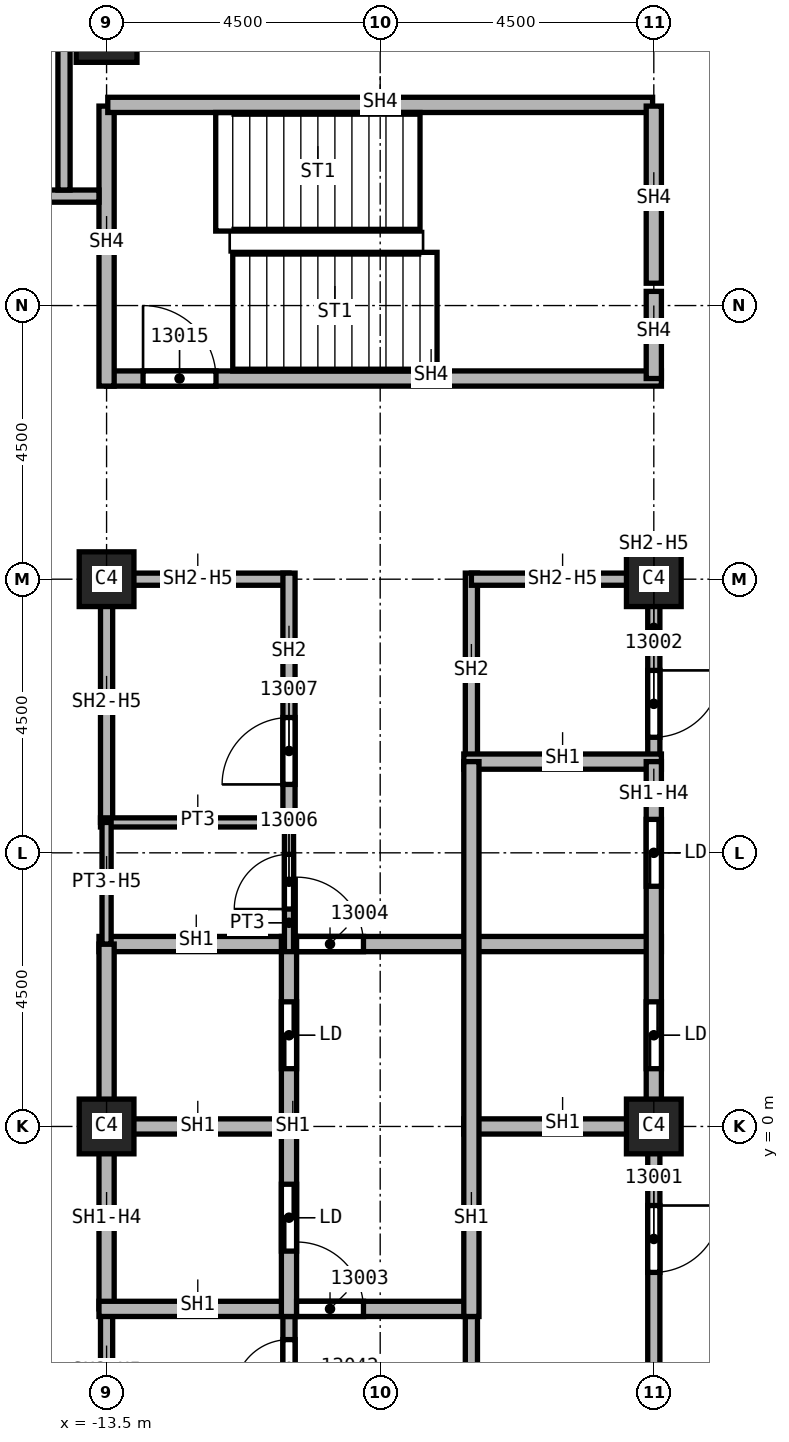
"""IFC4 building model, lengths in metres.
Left out: names, types, materials, properties, quantities, classifications, styles, units other than length and angle.
Written with IfcOpenShell. Run it as: python <this file> out.ifc"""

import sys

from ifc_helpers import new_model, si_unit, direction, frame, frame_2d, origin, origin_2d, place, context, subcontext, project, spatial, rectangle, extrude, element, fill, save


model = new_model("IFC4")
c1 = context("Model", 3, precision=1e-05, world=origin(), true_north=direction((0.0, 1.0)))
c2 = subcontext(c1, "Body", "Model", "MODEL_VIEW")
j1 = project(units=[si_unit("LENGTHUNIT", "METRE"), si_unit("PLANEANGLEUNIT", "RADIAN")], contexts=[c1])
p1 = place(None, origin())
s1 = spatial("IfcSite", under=j1, at=p1, CompositionType="ELEMENT")
p2 = place(p1, origin())
s2 = spatial("IfcBuilding", under=s1, at=p2, CompositionType="ELEMENT")
p3 = place(p2, frame((0.0, 0.0, 208.0)))
s3 = spatial("IfcBuildingStorey", under=s2, at=p3, CompositionType="ELEMENT", Elevation=208.0)
p4 = place(p3, frame((-13.5, 18.0, 0.0), z_axis=(0.0, 0.0, 1.0), x_axis=(1.0, 0.0, 0.0)))
e1 = element("IfcColumn", 1, at=p4, inside=s3, PredefinedType="COLUMN", context=c2, shape_type="SweptSolid", body=[
    extrude(rectangle(XDim=1.0, YDim=1.0, at=origin_2d()), origin(), (0.0, 0.0, 1.0), 3.72),
])
for number, where, z_axis, x_axis in (
    (2, (-4.5, 0.0, 0.0), (0.0, 0.0, 1.0), (1.0, 0.0, 0.0)),
    (3, (-4.5, 9.0, 0.0), (0.0, 0.0, 1.0), (1.0, 0.0, 0.0)),
    (4, (-13.5, 0.0, 0.0), (0.0, 0.0, 1.0), (1.0, 0.0, 0.0)),
    (5, (-13.5, 9.0, 0.0), (0.0, 0.0, 1.0), (1.0, 0.0, 0.0)),
):
    element("IfcColumn", number, at=place(p3, frame(where, z_axis=z_axis, x_axis=x_axis)), inside=s3, PredefinedType="COLUMN", context=c2, shape_type="SweptSolid", body=[
        extrude(rectangle(XDim=0.9, YDim=0.9, at=origin_2d()), origin(), (0.0, 0.0, 1.0), 3.72),
    ])
p5 = place(p3, frame((-13.5, -5.0, 0.0), z_axis=(0.0, 0.0, 1.0), x_axis=(0.0, 1.0, 0.0)))
e6 = element("IfcWall", 6, at=p5, inside=s3, PredefinedType="SOLIDWALL", context=c2, shape_type="SweptSolid", body=[
    extrude(rectangle(XDim=2.0, YDim=0.2, at=frame_2d((1.0, 0.0))), origin(), (0.0, 0.0, 1.0), 2.958),
])
p6 = place(p3, frame((-13.5, 5.0, 0.0), z_axis=(0.0, 0.0, 1.0), x_axis=(0.0, 1.0, 0.0)))
e7 = element("IfcWall", 7, at=p6, inside=s3, PredefinedType="SOLIDWALL", context=c2, shape_type="SweptSolid", body=[
    extrude(rectangle(XDim=4.1, YDim=0.2, at=frame_2d((2.05, 0.0))), origin(), (0.0, 0.0, 1.0), 2.958),
])
p7 = place(p3, frame((-13.5, 9.0, 0.0), z_axis=(0.0, 0.0, 1.0), x_axis=(1.0, 0.0, 0.0)))
e8 = element("IfcWall", 8, at=p7, inside=s3, PredefinedType="SOLIDWALL", context=c2, shape_type="SweptSolid", body=[
    extrude(rectangle(XDim=3.0, YDim=0.2, at=frame_2d((1.5, 0.0))), origin(), (0.0, 0.0, 1.0), 2.958),
])
p8 = place(p3, frame((-10.5, -5.075, 0.0), z_axis=(0.0, 0.0, 1.0), x_axis=(0.0, 1.0, 0.0)))
e9 = element("IfcWall", 9, at=p8, inside=s3, PredefinedType="SOLIDWALL", context=c2, shape_type="SweptSolid", body=[
    extrude(rectangle(XDim=2.2, YDim=0.2, at=frame_2d((1.1, 0.0))), origin(), (0.0, 0.0, 1.0), 3.72),
])
p9 = place(p8, frame((0.67, 0.0, 0.0)))
e10 = element("IfcOpeningElement", 10, at=p9, cuts=e9, PredefinedType="OPENING", context=c2, shape_type="SweptSolid", body=[
    extrude(rectangle(XDim=0.9, YDim=2.1, at=frame_2d((0.45, 1.05))), frame((0.0, 0.1, 0.0), z_axis=(0.0, -1.0, 0.0), x_axis=(1.0, 0.0, 0.0)), (0.0, 0.0, 1.0), 0.2),
])
p10 = place(p3, frame((-10.5, 4.925, 0.0), z_axis=(0.0, 0.0, 1.0), x_axis=(0.0, 1.0, 0.0)))
e11 = element("IfcWall", 11, at=p10, inside=s3, PredefinedType="SOLIDWALL", context=c2, shape_type="SweptSolid", body=[
    extrude(rectangle(XDim=4.175, YDim=0.2, at=frame_2d((2.087, 0.0))), origin(), (0.0, 0.0, 1.0), 3.72),
])
p11 = place(p10, frame((0.7, 0.0, 0.0)))
e12 = element("IfcOpeningElement", 12, at=p11, cuts=e11, PredefinedType="OPENING", context=c2, shape_type="SweptSolid", body=[
    extrude(rectangle(XDim=1.1, YDim=2.1, at=frame_2d((0.55, 1.05))), frame((0.0, 0.1, 0.0), z_axis=(0.0, -1.0, 0.0), x_axis=(1.0, 0.0, 0.0)), (0.0, 0.0, 1.0), 0.2),
])
p12 = place(p3, frame((-7.5, -9.1, 0.0), z_axis=(0.0, 0.0, 1.0), x_axis=(0.0, 1.0, 0.0)))
e13 = element("IfcWall", 13, at=p12, inside=s3, PredefinedType="SOLIDWALL", context=c2, shape_type="SweptSolid", body=[
    extrude(rectangle(XDim=6.225, YDim=0.2, at=frame_2d((3.113, 0.0))), origin(), (0.0, 0.0, 1.0), 3.72),
])
p13 = place(p3, frame((-7.5, 6.0, 0.0), z_axis=(0.0, 0.0, 1.0), x_axis=(0.0, 1.0, 0.0)))
e14 = element("IfcWall", 14, at=p13, inside=s3, PredefinedType="SOLIDWALL", context=c2, shape_type="SweptSolid", body=[
    extrude(rectangle(XDim=3.1, YDim=0.2, at=frame_2d((1.55, 0.0))), origin(), (0.0, 0.0, 1.0), 3.72),
])
p14 = place(p3, frame((-7.5, 9.0, 0.0), z_axis=(0.0, 0.0, 1.0), x_axis=(1.0, 0.0, 0.0)))
e15 = element("IfcWall", 15, at=p14, inside=s3, PredefinedType="SOLIDWALL", context=c2, shape_type="SweptSolid", body=[
    extrude(rectangle(XDim=3.0, YDim=0.2, at=frame_2d((1.5, 0.0))), origin(), (0.0, 0.0, 1.0), 2.958),
])
p15 = place(p3, frame((-4.5, 0.0, 0.0), z_axis=(0.0, 0.0, 1.0), x_axis=(0.0, -1.0, 0.0)))
e16 = element("IfcWall", 16, at=p15, inside=s3, PredefinedType="SOLIDWALL", context=c2, shape_type="SweptSolid", body=[
    extrude(rectangle(XDim=9.1, YDim=0.2, at=frame_2d((4.55, 0.0))), origin(), (0.0, 0.0, 1.0), 2.958),
])
p16 = place(p15, frame((1.3, 0.0, 0.0)))
e17 = element("IfcOpeningElement", 17, at=p16, cuts=e16, PredefinedType="OPENING", context=c2, shape_type="SweptSolid", body=[
    extrude(rectangle(XDim=1.1, YDim=2.1, at=frame_2d((0.55, 1.05))), frame((0.0, 0.1, 0.0), z_axis=(0.0, -1.0, 0.0), x_axis=(1.0, 0.0, 0.0)), (0.0, 0.0, 1.0), 0.2),
])
p17 = place(p3, frame((-4.5, 9.1, 0.0), z_axis=(0.0, 0.0, 1.0), x_axis=(0.0, -1.0, 0.0)))
e18 = element("IfcWall", 18, at=p17, inside=s3, PredefinedType="SOLIDWALL", context=c2, shape_type="SweptSolid", body=[
    extrude(rectangle(XDim=3.1, YDim=0.2, at=frame_2d((1.55, 0.0))), origin(), (0.0, 0.0, 1.0), 2.958),
])
p18 = place(p17, frame((1.6, 0.0, 0.0)))
e19 = element("IfcOpeningElement", 19, at=p18, cuts=e18, PredefinedType="OPENING", context=c2, shape_type="SweptSolid", body=[
    extrude(rectangle(XDim=1.1, YDim=2.1, at=frame_2d((0.55, 1.05))), frame((0.0, 0.1, 0.0), z_axis=(0.0, -1.0, 0.0), x_axis=(1.0, 0.0, 0.0)), (0.0, 0.0, 1.0), 0.2),
])
p19 = place(p3, frame((-13.625, 0.0, 0.0), z_axis=(0.0, 0.0, 1.0), x_axis=(1.0, 0.0, 0.0)))
e20 = element("IfcWall", 20, at=p19, inside=s3, PredefinedType="SOLIDWALL", context=c2, shape_type="SweptSolid", body=[
    extrude(rectangle(XDim=3.125, YDim=0.25, at=frame_2d((1.562, 0.0))), origin(), (0.0, 0.0, 1.0), 3.72),
])
p20 = place(p3, frame((-13.625, 3.0, 0.0), z_axis=(0.0, 0.0, 1.0), x_axis=(1.0, 0.0, 0.0)))
e21 = element("IfcWall", 21, at=p20, inside=s3, PredefinedType="SOLIDWALL", context=c2, shape_type="SweptSolid", body=[
    extrude(rectangle(XDim=9.25, YDim=0.25, at=frame_2d((4.625, 0.0))), origin(), (0.0, 0.0, 1.0), 3.72),
])
p21 = place(p20, frame((3.25, 0.0, 0.0)))
e22 = element("IfcOpeningElement", 22, at=p21, cuts=e21, PredefinedType="OPENING", context=c2, shape_type="SweptSolid", body=[
    extrude(rectangle(XDim=1.1, YDim=2.1, at=frame_2d((0.55, 1.05))), frame((0.0, 0.125, 0.0), z_axis=(0.0, -1.0, 0.0), x_axis=(1.0, 0.0, 0.0)), (0.0, 0.0, 1.0), 0.25),
])
p22 = place(p3, frame((-13.5, -3.0, 0.0), z_axis=(0.0, 0.0, 1.0), x_axis=(0.0, 1.0, 0.0)))
e23 = element("IfcWall", 23, at=p22, inside=s3, PredefinedType="SOLIDWALL", context=c2, shape_type="SweptSolid", body=[
    extrude(rectangle(XDim=6.0, YDim=0.25, at=frame_2d((3.0, 0.0))), origin(), (0.0, 0.0, 1.0), 2.958),
])
p23 = place(p3, frame((-13.625, -3.0, 0.0), z_axis=(0.0, 0.0, 1.0), x_axis=(1.0, 0.0, 0.0)))
e24 = element("IfcWall", 24, at=p23, inside=s3, PredefinedType="SOLIDWALL", context=c2, shape_type="SweptSolid", body=[
    extrude(rectangle(XDim=6.125, YDim=0.25, at=frame_2d((3.062, 0.0))), origin(), (0.0, 0.0, 1.0), 3.72),
])
p24 = place(p23, frame((3.25, 0.0, 0.0)))
e25 = element("IfcOpeningElement", 25, at=p24, cuts=e24, PredefinedType="OPENING", context=c2, shape_type="SweptSolid", body=[
    extrude(rectangle(XDim=1.1, YDim=2.1, at=frame_2d((0.55, 1.05))), frame((0.0, 0.125, 0.0), z_axis=(0.0, -1.0, 0.0), x_axis=(1.0, 0.0, 0.0)), (0.0, 0.0, 1.0), 0.25),
])
p25 = place(p3, frame((-10.5, -3.125, 0.0), z_axis=(0.0, 0.0, 1.0), x_axis=(0.0, 1.0, 0.0)))
e26 = element("IfcWall", 26, at=p25, inside=s3, PredefinedType="SOLIDWALL", context=c2, shape_type="SweptSolid", body=[
    extrude(rectangle(XDim=6.25, YDim=0.25, at=frame_2d((3.125, 0.0))), origin(), (0.0, 0.0, 1.0), 3.72),
])
p26 = place(p25, frame((1.075, 0.0, 0.0)))
e27 = element("IfcOpeningElement", 27, at=p26, cuts=e26, PredefinedType="OPENING", context=c2, shape_type="SweptSolid", body=[
    extrude(rectangle(XDim=1.1, YDim=2.1, at=frame_2d((0.55, 1.05))), frame((0.0, 0.125, 0.0), z_axis=(0.0, -1.0, 0.0), x_axis=(1.0, 0.0, 0.0)), (0.0, 0.0, 1.0), 0.25),
])
p27 = place(p25, frame((4.075, 0.0, 0.0)))
e28 = element("IfcOpeningElement", 28, at=p27, cuts=e26, PredefinedType="OPENING", context=c2, shape_type="SweptSolid", body=[
    extrude(rectangle(XDim=1.1, YDim=2.1, at=frame_2d((0.55, 1.05))), frame((0.0, 0.125, 0.0), z_axis=(0.0, -1.0, 0.0), x_axis=(1.0, 0.0, 0.0)), (0.0, 0.0, 1.0), 0.25),
])
for number, where, z_axis, x_axis in (
    (29, (-7.625, 0.0, 0.0), (0.0, 0.0, 1.0), (1.0, 0.0, 0.0)),
    (30, (-7.625, 6.0, 0.0), (0.0, 0.0, 1.0), (1.0, 0.0, 0.0)),
):
    element("IfcWall", number, at=place(p3, frame(where, z_axis=z_axis, x_axis=x_axis)), inside=s3, PredefinedType="SOLIDWALL", context=c2, shape_type="SweptSolid", body=[
        extrude(rectangle(XDim=3.25, YDim=0.25, at=frame_2d((1.625, 0.0))), origin(), (0.0, 0.0, 1.0), 3.72),
    ])
p28 = place(p3, frame((-7.5, -3.125, 0.0), z_axis=(0.0, 0.0, 1.0), x_axis=(0.0, 1.0, 0.0)))
e31 = element("IfcWall", 31, at=p28, inside=s3, PredefinedType="SOLIDWALL", context=c2, shape_type="SweptSolid", body=[
    extrude(rectangle(XDim=9.125, YDim=0.25, at=frame_2d((4.562, 0.0))), origin(), (0.0, 0.0, 1.0), 3.72),
])
p29 = place(p3, frame((-4.5, 6.0, 0.0), z_axis=(0.0, 0.0, 1.0), x_axis=(0.0, -1.0, 0.0)))
e32 = element("IfcWall", 32, at=p29, inside=s3, PredefinedType="SOLIDWALL", context=c2, shape_type="SweptSolid", body=[
    extrude(rectangle(XDim=6.0, YDim=0.25, at=frame_2d((3.0, 0.0))), origin(), (0.0, 0.0, 1.0), 2.958),
])
p30 = place(p29, frame((3.95, 0.0, 0.0)))
e33 = element("IfcOpeningElement", 33, at=p30, cuts=e32, PredefinedType="OPENING", context=c2, shape_type="SweptSolid", body=[
    extrude(rectangle(XDim=1.1, YDim=2.1, at=frame_2d((0.55, 1.05))), frame((0.0, 0.125, 0.0), z_axis=(0.0, -1.0, 0.0), x_axis=(1.0, 0.0, 0.0)), (0.0, 0.0, 1.0), 0.25),
])
p31 = place(p29, frame((0.95, 0.0, 0.0)))
e34 = element("IfcOpeningElement", 34, at=p31, cuts=e32, PredefinedType="OPENING", context=c2, shape_type="SweptSolid", body=[
    extrude(rectangle(XDim=1.1, YDim=2.1, at=frame_2d((0.55, 1.05))), frame((0.0, 0.125, 0.0), z_axis=(0.0, -1.0, 0.0), x_axis=(1.0, 0.0, 0.0)), (0.0, 0.0, 1.0), 0.25),
])
p32 = place(p3, frame((-13.5, 12.3, 0.0), z_axis=(0.0, 0.0, 1.0), x_axis=(1.0, 0.0, 0.0)))
e35 = element("IfcWall", 35, at=p32, inside=s3, PredefinedType="SOLIDWALL", context=c2, shape_type="SweptSolid", body=[
    extrude(rectangle(XDim=9.125, YDim=0.25, at=frame_2d((4.562, 0.0))), origin(), (0.0, 0.0, 1.0), 3.72),
])
p33 = place(p32, frame((0.6, 0.0, 0.0)))
e36 = element("IfcOpeningElement", 36, at=p33, cuts=e35, PredefinedType="OPENING", context=c2, shape_type="SweptSolid", body=[
    extrude(rectangle(XDim=1.2, YDim=2.1, at=frame_2d((0.6, 1.05))), frame((0.0, 0.125, 0.0), z_axis=(0.0, -1.0, 0.0), x_axis=(1.0, 0.0, 0.0)), (0.0, 0.0, 1.0), 0.25),
])
p34 = place(p3, frame((-13.5, 16.78, 0.0), z_axis=(0.0, 0.0, 1.0), x_axis=(0.0, -1.0, 0.0)))
e37 = element("IfcWall", 37, at=p34, inside=s3, PredefinedType="SOLIDWALL", context=c2, shape_type="SweptSolid", body=[
    extrude(rectangle(XDim=4.605, YDim=0.25, at=frame_2d((2.302, 0.0))), origin(), (0.0, 0.0, 1.0), 3.72),
])
p35 = place(p3, frame((-13.48, 16.8, 0.0), z_axis=(0.0, 0.0, 1.0), x_axis=(1.0, 0.0, 0.0)))
e38 = element("IfcWall", 38, at=p35, inside=s3, PredefinedType="SOLIDWALL", context=c2, shape_type="SweptSolid", body=[
    extrude(rectangle(XDim=8.96, YDim=0.25, at=frame_2d((4.48, 0.0))), origin(), (0.0, 0.0, 1.0), 3.72),
])
p36 = place(p3, frame((-4.5, 13.733, 0.0), z_axis=(0.0, 0.0, 1.0), x_axis=(0.0, -1.0, 0.0)))
e39 = element("IfcWall", 39, at=p36, inside=s3, PredefinedType="SOLIDWALL", context=c2, shape_type="SweptSolid", body=[
    extrude(rectangle(XDim=1.433, YDim=0.25, at=frame_2d((0.716, 0.0))), origin(), (0.0, 0.0, 1.0), 3.72),
])
p37 = place(p3, frame((-4.5, 16.78, 0.0), z_axis=(0.0, 0.0, 1.0), x_axis=(0.0, -1.0, 0.0)))
e40 = element("IfcWall", 40, at=p37, inside=s3, PredefinedType="SOLIDWALL", context=c2, shape_type="SweptSolid", body=[
    extrude(rectangle(XDim=2.913, YDim=0.25, at=frame_2d((1.457, 0.0))), origin(), (0.0, 0.0, 1.0), 3.72),
])
p38 = place(p3, frame((-13.6, 5.0, 0.0), z_axis=(0.0, 0.0, 1.0), x_axis=(1.0, 0.0, 0.0)))
e41 = element("IfcWall", 41, at=p38, inside=s3, PredefinedType="PARTITIONING", context=c2, shape_type="SweptSolid", body=[
    extrude(rectangle(XDim=3.1, YDim=0.15, at=frame_2d((1.55, 0.0))), origin(), (0.0, 0.0, 1.0), 3.72),
])
p39 = place(p3, frame((-13.5, 3.0, 0.0), z_axis=(0.0, 0.0, 1.0), x_axis=(0.0, 1.0, 0.0)))
e42 = element("IfcWall", 42, at=p39, inside=s3, PredefinedType="PARTITIONING", context=c2, shape_type="SweptSolid", body=[
    extrude(rectangle(XDim=2.0, YDim=0.15, at=frame_2d((1.0, 0.0))), origin(), (0.0, 0.0, 1.0), 2.958),
])
p40 = place(p3, frame((-10.5, 2.875, 0.0), z_axis=(0.0, 0.0, 1.0), x_axis=(0.0, 1.0, 0.0)))
e43 = element("IfcWall", 43, at=p40, inside=s3, PredefinedType="PARTITIONING", context=c2, shape_type="SweptSolid", body=[
    extrude(rectangle(XDim=2.2, YDim=0.15, at=frame_2d((1.1, 0.0))), origin(), (0.0, 0.0, 1.0), 3.72),
])
p41 = place(p40, frame((0.7, 0.0, 0.0)))
e44 = element("IfcOpeningElement", 44, at=p41, cuts=e43, PredefinedType="OPENING", context=c2, shape_type="SweptSolid", body=[
    extrude(rectangle(XDim=0.9, YDim=2.1, at=frame_2d((0.45, 1.05))), frame((0.0, 0.075, 0.0), z_axis=(0.0, -1.0, 0.0), x_axis=(1.0, 0.0, 0.0)), (0.0, 0.0, 1.0), 0.15),
])
p42 = place(p3, frame((-21.9, 15.3, 0.0), z_axis=(0.0, 0.0, 1.0), x_axis=(1.0, 0.0, 0.0)))
e45 = element("IfcWall", 45, at=p42, inside=s3, PredefinedType="SOLIDWALL", context=c2, shape_type="SweptSolid", body=[
    extrude(rectangle(XDim=8.275, YDim=0.2, at=frame_2d((4.137, 0.0))), origin(), (0.0, 0.0, 1.0), 3.72),
])
p43 = place(p42, frame((4.8, 0.0, 0.0)))
e46 = element("IfcOpeningElement", 46, at=p43, cuts=e45, PredefinedType="OPENING", context=c2, shape_type="SweptSolid", body=[
    extrude(rectangle(XDim=1.2, YDim=2.1, at=frame_2d((0.6, 1.05))), frame((0.0, 0.1, 0.0), z_axis=(0.0, -1.0, 0.0), x_axis=(1.0, 0.0, 0.0)), (0.0, 0.0, 1.0), 0.2),
])
p44 = place(p3, frame((-14.2, 15.4, 0.0), z_axis=(0.0, 0.0, 1.0), x_axis=(0.0, 1.0, 0.0)))
e47 = element("IfcWall", 47, at=p44, inside=s3, PredefinedType="SOLIDWALL", context=c2, shape_type="SweptSolid", body=[
    extrude(rectangle(XDim=5.9, YDim=0.2, at=frame_2d((2.95, 0.0))), origin(), (0.0, 0.0, 1.0), 3.72),
])
p45 = place(p16, origin())
e48 = element("IfcDoor", 48, at=p45, inside=s3, OperationType="SINGLE_SWING_RIGHT", PredefinedType="DOOR", context=c2, shape_type="SweptSolid", body=[
    extrude(rectangle(XDim=1.1, YDim=2.1, at=frame_2d((0.55, 1.05))), frame((0.0, 0.025, 0.0), z_axis=(0.0, -1.0, 0.0), x_axis=(1.0, 0.0, 0.0)), (0.0, 0.0, 1.0), 0.05),
])
fill(e17, e48)
p46 = place(p18, origin())
e49 = element("IfcDoor", 49, at=p46, inside=s3, OperationType="SINGLE_SWING_LEFT", PredefinedType="DOOR", context=c2, shape_type="SweptSolid", body=[
    extrude(rectangle(XDim=1.1, YDim=2.1, at=frame_2d((0.55, 1.05))), frame((0.0, 0.025, 0.0), z_axis=(0.0, -1.0, 0.0), x_axis=(1.0, 0.0, 0.0)), (0.0, 0.0, 1.0), 0.05),
])
fill(e19, e49)
p47 = place(p24, origin())
e50 = element("IfcDoor", 50, at=p47, inside=s3, OperationType="SINGLE_SWING_RIGHT", PredefinedType="DOOR", context=c2, shape_type="SweptSolid", body=[
    extrude(rectangle(XDim=1.1, YDim=2.1, at=frame_2d((0.55, 1.05))), frame((0.0, 0.025, 0.0), z_axis=(0.0, -1.0, 0.0), x_axis=(1.0, 0.0, 0.0)), (0.0, 0.0, 1.0), 0.05),
])
fill(e25, e50)
p48 = place(p21, origin())
e51 = element("IfcDoor", 51, at=p48, inside=s3, OperationType="SINGLE_SWING_LEFT", PredefinedType="DOOR", context=c2, shape_type="SweptSolid", body=[
    extrude(rectangle(XDim=1.1, YDim=2.1, at=frame_2d((0.55, 1.05))), frame((0.0, 0.025, 0.0), z_axis=(0.0, -1.0, 0.0), x_axis=(1.0, 0.0, 0.0)), (0.0, 0.0, 1.0), 0.05),
])
fill(e22, e51)
p49 = place(p41, origin())
e52 = element("IfcDoor", 52, at=p49, inside=s3, OperationType="SINGLE_SWING_LEFT", PredefinedType="DOOR", context=c2, shape_type="SweptSolid", body=[
    extrude(rectangle(XDim=0.9, YDim=2.1, at=frame_2d((0.45, 1.05))), frame((0.0, 0.025, 0.0), z_axis=(0.0, -1.0, 0.0), x_axis=(1.0, 0.0, 0.0)), (0.0, 0.0, 1.0), 0.05),
])
fill(e44, e52)
p50 = place(p11, origin())
e53 = element("IfcDoor", 53, at=p50, inside=s3, OperationType="SINGLE_SWING_RIGHT", PredefinedType="DOOR", context=c2, shape_type="SweptSolid", body=[
    extrude(rectangle(XDim=1.1, YDim=2.1, at=frame_2d((0.55, 1.05))), frame((0.0, 0.025, 0.0), z_axis=(0.0, -1.0, 0.0), x_axis=(1.0, 0.0, 0.0)), (0.0, 0.0, 1.0), 0.05),
])
fill(e12, e53)
p51 = place(p33, origin())
e54 = element("IfcDoor", 54, at=p51, inside=s3, OperationType="SINGLE_SWING_RIGHT", PredefinedType="DOOR", context=c2, shape_type="SweptSolid", body=[
    extrude(rectangle(XDim=1.2, YDim=2.1, at=frame_2d((0.6, 1.05))), frame((0.0, 0.025, 0.0), z_axis=(0.0, -1.0, 0.0), x_axis=(1.0, 0.0, 0.0)), (0.0, 0.0, 1.0), 0.05),
])
fill(e36, e54)
p52 = place(p9, origin())
e55 = element("IfcDoor", 55, at=p52, inside=s3, OperationType="SINGLE_SWING_LEFT", PredefinedType="DOOR", context=c2, shape_type="SweptSolid", body=[
    extrude(rectangle(XDim=0.9, YDim=2.1, at=frame_2d((0.45, 1.05))), frame((0.0, 0.025, 0.0), z_axis=(0.0, -1.0, 0.0), x_axis=(1.0, 0.0, 0.0)), (0.0, 0.0, 1.0), 0.05),
])
fill(e10, e55)
p53 = place(p30, origin())
e56 = element("IfcDoor", 56, at=p53, inside=s3, OperationType="SLIDING_TO_LEFT", PredefinedType="DOOR", context=c2, shape_type="SweptSolid", body=[
    extrude(rectangle(XDim=1.1, YDim=2.1, at=frame_2d((0.55, 1.05))), frame((0.0, 0.025, 0.0), z_axis=(0.0, -1.0, 0.0), x_axis=(1.0, 0.0, 0.0)), (0.0, 0.0, 1.0), 0.05),
])
fill(e33, e56)
p54 = place(p31, origin())
e57 = element("IfcDoor", 57, at=p54, inside=s3, OperationType="SLIDING_TO_LEFT", PredefinedType="DOOR", context=c2, shape_type="SweptSolid", body=[
    extrude(rectangle(XDim=1.1, YDim=2.1, at=frame_2d((0.55, 1.05))), frame((0.0, 0.025, 0.0), z_axis=(0.0, -1.0, 0.0), x_axis=(1.0, 0.0, 0.0)), (0.0, 0.0, 1.0), 0.05),
])
fill(e34, e57)
p55 = place(p26, origin())
e58 = element("IfcDoor", 58, at=p55, inside=s3, OperationType="SLIDING_TO_LEFT", PredefinedType="DOOR", context=c2, shape_type="SweptSolid", body=[
    extrude(rectangle(XDim=1.1, YDim=2.1, at=frame_2d((0.55, 1.05))), frame((0.0, 0.025, 0.0), z_axis=(0.0, -1.0, 0.0), x_axis=(1.0, 0.0, 0.0)), (0.0, 0.0, 1.0), 0.05),
])
fill(e27, e58)
p56 = place(p27, origin())
e59 = element("IfcDoor", 59, at=p56, inside=s3, OperationType="SLIDING_TO_LEFT", PredefinedType="DOOR", context=c2, shape_type="SweptSolid", body=[
    extrude(rectangle(XDim=1.1, YDim=2.1, at=frame_2d((0.55, 1.05))), frame((0.0, 0.025, 0.0), z_axis=(0.0, -1.0, 0.0), x_axis=(1.0, 0.0, 0.0)), (0.0, 0.0, 1.0), 0.05),
])
fill(e28, e59)
save(model, sys.argv[1])
